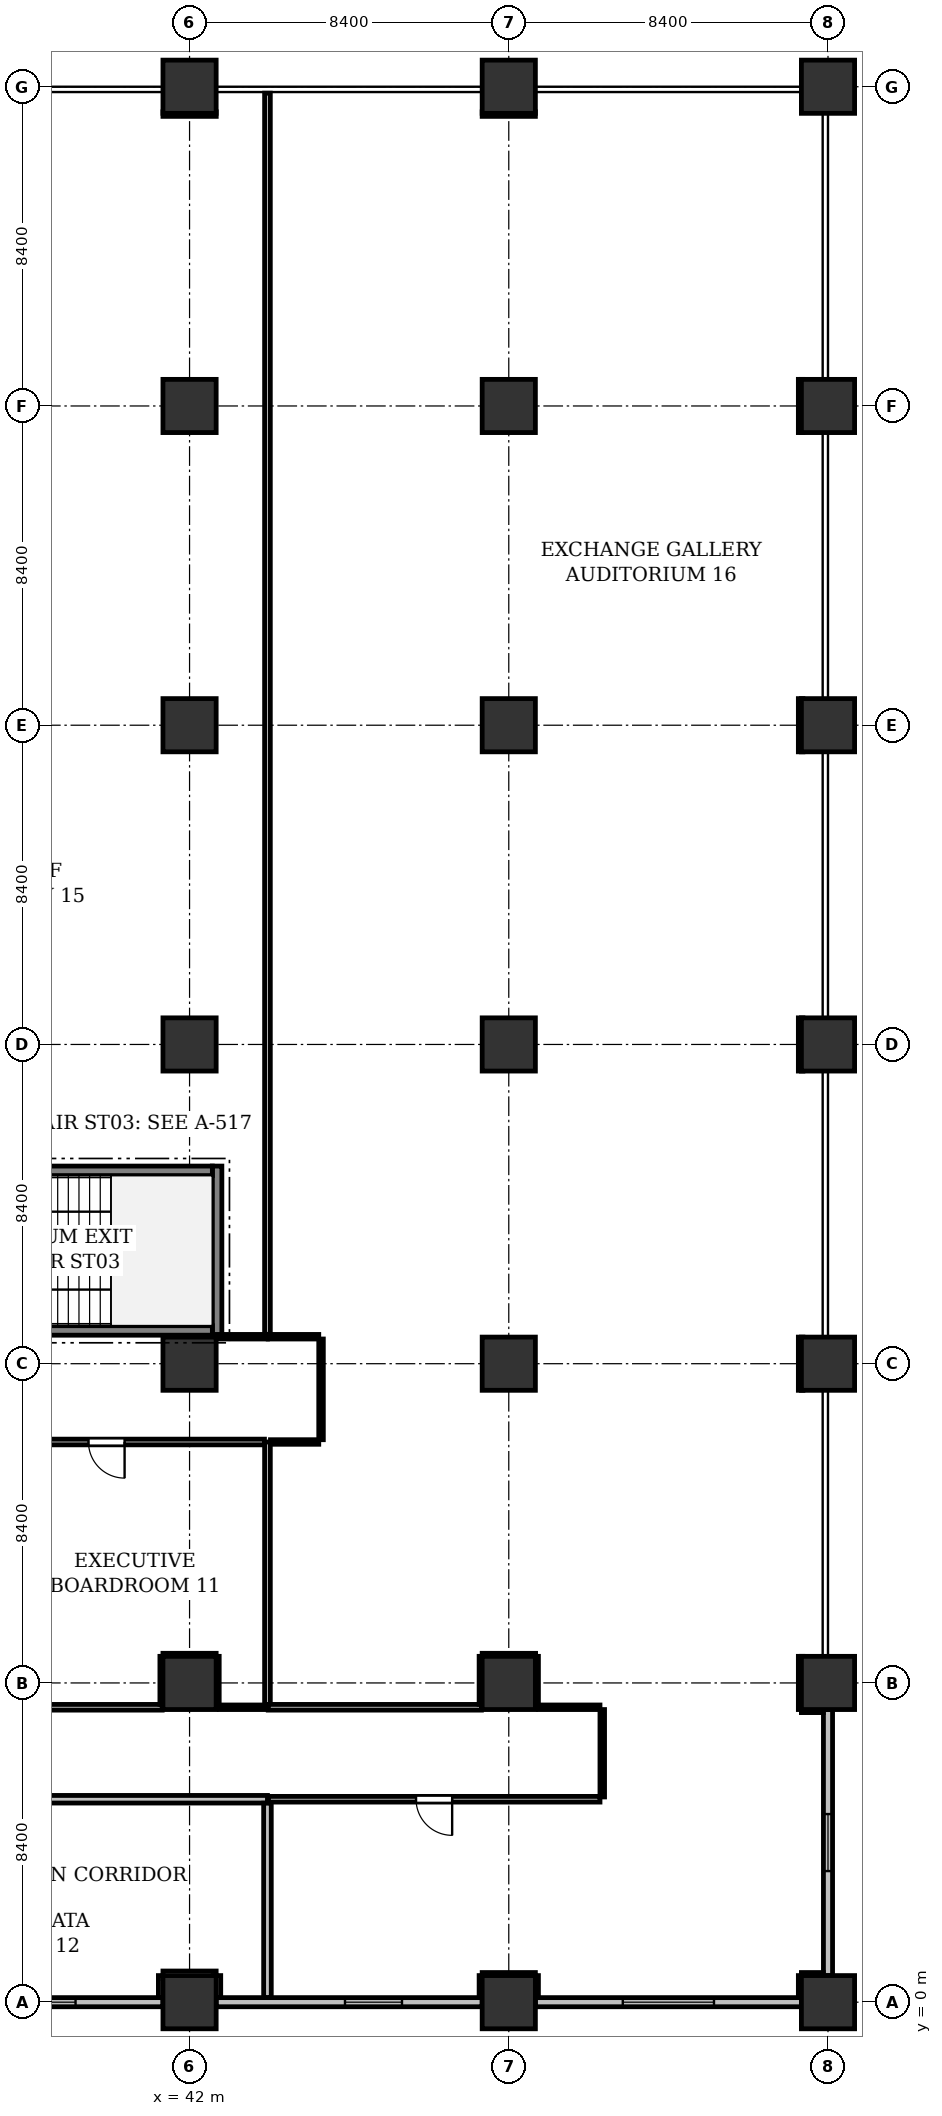
"""IFC4 building model, lengths in metres.
Left out: names, types, materials, properties, quantities, classifications, styles, units other than length and angle.
Written with IfcOpenShell. Run it as: python <this file> out.ifc"""

import sys

from ifc_helpers import new_model, si_unit, direction, frame, frame_2d, origin, origin_2d, place, context, subcontext, project, spatial, rectangle, extrude, element, fill, save


model = new_model("IFC4")
c1 = context("Model", 3, precision=1e-05, world=origin(), true_north=direction((0.0, 1.0)))
c2 = subcontext(c1, "Body", "Model", "MODEL_VIEW")
j1 = project(units=[si_unit("LENGTHUNIT", "METRE"), si_unit("PLANEANGLEUNIT", "RADIAN")], contexts=[c1])
p1 = place(None, origin())
s1 = spatial("IfcSite", under=j1, at=p1, CompositionType="ELEMENT")
p2 = place(p1, origin())
s2 = spatial("IfcBuilding", under=s1, at=p2, CompositionType="ELEMENT")
p3 = place(p2, frame((0.0, 0.0, 5.4)))
s3 = spatial("IfcBuildingStorey", under=s2, at=p3, CompositionType="ELEMENT", Elevation=5.4)
for number, where, z_axis, x_axis in (
    (1, (42.0, 0.0, 0.0), (0.0, 0.0, 1.0), (1.0, 0.0, 0.0)),
    (2, (42.0, 8.4, 0.0), (0.0, 0.0, 1.0), (1.0, 0.0, 0.0)),
    (3, (42.0, 16.8, 0.0), (0.0, 0.0, 1.0), (1.0, 0.0, 0.0)),
    (4, (42.0, 25.2, 0.0), (0.0, 0.0, 1.0), (1.0, 0.0, 0.0)),
    (5, (42.0, 33.6, 0.0), (0.0, 0.0, 1.0), (1.0, 0.0, 0.0)),
    (6, (42.0, 42.0, 0.0), (0.0, 0.0, 1.0), (1.0, 0.0, 0.0)),
    (7, (42.0, 50.4, 0.0), (0.0, 0.0, 1.0), (1.0, 0.0, 0.0)),
    (8, (50.4, 0.0, 0.0), (0.0, 0.0, 1.0), (1.0, 0.0, 0.0)),
    (9, (50.4, 8.4, 0.0), (0.0, 0.0, 1.0), (1.0, 0.0, 0.0)),
    (10, (50.4, 16.8, 0.0), (0.0, 0.0, 1.0), (1.0, 0.0, 0.0)),
    (11, (50.4, 25.2, 0.0), (0.0, 0.0, 1.0), (1.0, 0.0, 0.0)),
    (12, (50.4, 33.6, 0.0), (0.0, 0.0, 1.0), (1.0, 0.0, 0.0)),
    (13, (50.4, 42.0, 0.0), (0.0, 0.0, 1.0), (1.0, 0.0, 0.0)),
    (14, (50.4, 50.4, 0.0), (0.0, 0.0, 1.0), (1.0, 0.0, 0.0)),
    (15, (58.8, 0.0, 0.0), (0.0, 0.0, 1.0), (1.0, 0.0, 0.0)),
    (16, (58.8, 8.4, 0.0), (0.0, 0.0, 1.0), (1.0, 0.0, 0.0)),
    (17, (58.8, 16.8, 0.0), (0.0, 0.0, 1.0), (1.0, 0.0, 0.0)),
    (18, (58.8, 25.2, 0.0), (0.0, 0.0, 1.0), (1.0, 0.0, 0.0)),
    (19, (58.8, 33.6, 0.0), (0.0, 0.0, 1.0), (1.0, 0.0, 0.0)),
    (20, (58.8, 42.0, 0.0), (0.0, 0.0, 1.0), (1.0, 0.0, 0.0)),
    (21, (58.8, 50.4, 0.0), (0.0, 0.0, 1.0), (1.0, 0.0, 0.0)),
):
    element("IfcColumn", number, at=place(p3, frame(where, z_axis=z_axis, x_axis=x_axis)), inside=s3, PredefinedType="COLUMN", context=c2, shape_type="SweptSolid", body=[
        extrude(rectangle(XDim=1.4, YDim=1.4, at=origin_2d()), origin(), (0.0, 0.0, 1.0), 4.8),
    ])
p4 = place(p3, frame((58.8, 7.7, 0.0), z_axis=(0.0, 0.0, 1.0), x_axis=(0.0, -1.0, 0.0)))
e22 = element("IfcWall", 22, at=p4, inside=s3, PredefinedType="STANDARD", context=c2, shape_type="SweptSolid", body=[
    extrude(rectangle(XDim=7.0, YDim=0.24, at=frame_2d((3.5, 0.0))), origin(), (0.0, 0.0, 1.0), 3.913),
])
p5 = place(p4, frame((2.75, 0.0, 0.9)))
e23 = element("IfcOpeningElement", 23, at=p5, cuts=e22, PredefinedType="OPENING", context=c2, shape_type="SweptSolid", body=[
    extrude(rectangle(XDim=1.5, YDim=1.6, at=frame_2d((0.75, 0.8))), frame((0.0, 0.13, 0.0), z_axis=(0.0, -1.0, 0.0), x_axis=(1.0, 0.0, 0.0)), (0.0, 0.0, 1.0), 0.26),
])
p6 = place(p3, frame((58.1, 0.0, 0.0), z_axis=(0.0, 0.0, 1.0), x_axis=(-1.0, 0.0, 0.0)))
e24 = element("IfcWall", 24, at=p6, inside=s3, PredefinedType="STANDARD", context=c2, shape_type="SweptSolid", body=[
    extrude(rectangle(XDim=7.0, YDim=0.24, at=frame_2d((3.5, 0.0))), origin(), (0.0, 0.0, 1.0), 3.725),
])
p7 = place(p6, frame((2.3, 0.0, 0.9)))
e25 = element("IfcOpeningElement", 25, at=p7, cuts=e24, PredefinedType="OPENING", context=c2, shape_type="SweptSolid", body=[
    extrude(rectangle(XDim=2.4, YDim=1.8, at=frame_2d((1.2, 0.9))), frame((0.0, 0.13, 0.0), z_axis=(0.0, -1.0, 0.0), x_axis=(1.0, 0.0, 0.0)), (0.0, 0.0, 1.0), 0.26),
])
p8 = place(p3, frame((49.7, 0.0, 0.0), z_axis=(0.0, 0.0, 1.0), x_axis=(-1.0, 0.0, 0.0)))
e26 = element("IfcWall", 26, at=p8, inside=s3, PredefinedType="STANDARD", context=c2, shape_type="SweptSolid", body=[
    extrude(rectangle(XDim=7.0, YDim=0.24, at=frame_2d((3.5, 0.0))), origin(), (0.0, 0.0, 1.0), 3.725),
])
p9 = place(p8, frame((2.75, 0.0, 0.9)))
e27 = element("IfcOpeningElement", 27, at=p9, cuts=e26, PredefinedType="OPENING", context=c2, shape_type="SweptSolid", body=[
    extrude(rectangle(XDim=1.5, YDim=1.6, at=frame_2d((0.75, 0.8))), frame((0.0, 0.13, 0.0), z_axis=(0.0, -1.0, 0.0), x_axis=(1.0, 0.0, 0.0)), (0.0, 0.0, 1.0), 0.26),
])
p10 = place(p3, frame((41.3, 0.0, 0.0), z_axis=(0.0, 0.0, 1.0), x_axis=(-1.0, 0.0, 0.0)))
e28 = element("IfcWall", 28, at=p10, inside=s3, PredefinedType="STANDARD", context=c2, shape_type="SweptSolid", body=[
    extrude(rectangle(XDim=7.0, YDim=0.24, at=frame_2d((3.5, 0.0))), origin(), (0.0, 0.0, 1.0), 3.725),
])
p11 = place(p10, frame((3.224, 0.0, 0.9)))
e29 = element("IfcOpeningElement", 29, at=p11, cuts=e28, PredefinedType="OPENING", context=c2, shape_type="SweptSolid", body=[
    extrude(rectangle(XDim=2.4, YDim=1.8, at=frame_2d((1.2, 0.9))), frame((0.0, 0.13, 0.0), z_axis=(0.0, -1.0, 0.0), x_axis=(1.0, 0.0, 0.0)), (0.0, 0.0, 1.0), 0.26),
])
p12 = place(p3, frame((42.725, 17.55, 0.0), z_axis=(0.0, 0.0, 1.0), x_axis=(0.0, 1.0, 0.0)))
e30 = element("IfcWall", 30, at=p12, inside=s3, PredefinedType="SHEAR", context=c2, shape_type="SweptSolid", body=[
    extrude(rectangle(XDim=4.45, YDim=0.25, at=frame_2d((2.225, 0.0))), origin(), (0.0, 0.0, 1.0), 4.525),
])
for number, where, z_axis, x_axis in (
    (31, (34.65, 17.675, 0.0), (0.0, 0.0, 1.0), (1.0, 0.0, 0.0)),
    (32, (34.65, 21.875, 0.0), (0.0, 0.0, 1.0), (1.0, 0.0, 0.0)),
):
    element("IfcWall", number, at=place(p3, frame(where, z_axis=z_axis, x_axis=x_axis)), inside=s3, PredefinedType="SHEAR", context=c2, shape_type="SweptSolid", body=[
        extrude(rectangle(XDim=7.95, YDim=0.25, at=frame_2d((3.975, 0.0))), origin(), (0.0, 0.0, 1.0), 4.525),
    ])
p13 = place(p3, frame((39.362, 0.124, 0.0), z_axis=(0.0, 0.0, 1.0), x_axis=(0.0, 1.0, 0.0)))
e33 = element("IfcWall", 33, at=p13, inside=s3, PredefinedType="PARTITIONING", context=c2, shape_type="SweptSolid", body=[
    extrude(rectangle(XDim=14.616, YDim=0.15, at=frame_2d((7.308, 0.0))), origin(), (0.0, 0.0, 1.0), 3.725),
])
p14 = place(p3, frame((39.283, 14.74, 0.0), z_axis=(0.0, 0.0, 1.0), x_axis=(-1.0, 0.0, 0.0)))
e34 = element("IfcWall", 34, at=p14, inside=s3, PredefinedType="PARTITIONING", context=c2, shape_type="SweptSolid", body=[
    extrude(rectangle(XDim=3.623, YDim=0.135, at=frame_2d((1.812, 0.0))), origin(), (0.0, 0.0, 1.0), 4.122),
])
p15 = place(p14, frame((1.336, 0.0, 0.0)))
e35 = element("IfcOpeningElement", 35, at=p15, cuts=e34, PredefinedType="OPENING", context=c2, shape_type="SweptSolid", body=[
    extrude(rectangle(XDim=0.95, YDim=2.15, at=frame_2d((0.475, 1.075))), frame((0.0, 0.077, 0.0), z_axis=(0.0, -1.0, 0.0), x_axis=(1.0, 0.0, 0.0)), (0.0, 0.0, 1.0), 0.155),
])
p16 = place(p3, frame((39.362, 22.004, 0.0), z_axis=(0.0, 0.0, 1.0), x_axis=(0.0, 1.0, 0.0)))
e36 = element("IfcWall", 36, at=p16, inside=s3, PredefinedType="PARTITIONING", context=c2, shape_type="SweptSolid", body=[
    extrude(rectangle(XDim=28.227, YDim=0.15, at=frame_2d((14.114, 0.0))), origin(), (0.0, 0.0, 1.0), 3.725),
])
p17 = place(p3, frame((45.4, 14.74, 0.0), z_axis=(0.0, 0.0, 1.0), x_axis=(-1.0, 0.0, 0.0)))
e37 = element("IfcWall", 37, at=p17, inside=s3, PredefinedType="PARTITIONING", context=c2, shape_type="SweptSolid", body=[
    extrude(rectangle(XDim=5.959, YDim=0.15, at=frame_2d((2.979, 0.0))), origin(), (0.0, 0.0, 1.0), 3.913),
])
p18 = place(p3, frame((41.28, 0.124, 0.0), z_axis=(0.0, 0.0, 1.0), x_axis=(0.0, 1.0, 0.0)))
e38 = element("IfcWall", 38, at=p18, inside=s3, PredefinedType="PARTITIONING", context=c2, shape_type="SweptSolid", body=[
    extrude(rectangle(XDim=0.576, YDim=0.12, at=frame_2d((0.288, 0.0))), origin(), (0.0, 0.0, 1.0), 4.525),
])
p19 = place(p3, frame((41.3, 0.72, 0.0), z_axis=(0.0, 0.0, 1.0), x_axis=(1.0, 0.0, 0.0)))
e39 = element("IfcWall", 39, at=p19, inside=s3, PredefinedType="PARTITIONING", context=c2, shape_type="SweptSolid", body=[
    extrude(rectangle(XDim=1.4, YDim=0.12, at=frame_2d((0.7, 0.0))), origin(), (0.0, 0.0, 1.0), 3.913),
])
for number, where, z_axis, x_axis in (
    (40, (42.72, 0.7, 0.0), (0.0, 0.0, 1.0), (0.0, -1.0, 0.0)),
    (41, (49.68, 0.124, 0.0), (0.0, 0.0, 1.0), (0.0, 1.0, 0.0)),
):
    element("IfcWall", number, at=place(p3, frame(where, z_axis=z_axis, x_axis=x_axis)), inside=s3, PredefinedType="PARTITIONING", context=c2, shape_type="SweptSolid", body=[
        extrude(rectangle(XDim=0.576, YDim=0.12, at=frame_2d((0.288, 0.0))), origin(), (0.0, 0.0, 1.0), 4.525),
    ])
p20 = place(p3, frame((49.7, 0.72, 0.0), z_axis=(0.0, 0.0, 1.0), x_axis=(1.0, 0.0, 0.0)))
e42 = element("IfcWall", 42, at=p20, inside=s3, PredefinedType="PARTITIONING", context=c2, shape_type="SweptSolid", body=[
    extrude(rectangle(XDim=1.4, YDim=0.12, at=frame_2d((0.7, 0.0))), origin(), (0.0, 0.0, 1.0), 3.913),
])
for number, where, z_axis, x_axis in (
    (43, (51.12, 0.7, 0.0), (0.0, 0.0, 1.0), (0.0, -1.0, 0.0)),
    (44, (58.08, 0.124, 0.0), (0.0, 0.0, 1.0), (0.0, 1.0, 0.0)),
    (45, (58.1, 0.72, 0.0), (0.0, 0.0, 1.0), (1.0, 0.0, 0.0)),
    (46, (58.676, 7.68, 0.0), (0.0, 0.0, 1.0), (-1.0, 0.0, 0.0)),
):
    element("IfcWall", number, at=place(p3, frame(where, z_axis=z_axis, x_axis=x_axis)), inside=s3, PredefinedType="PARTITIONING", context=c2, shape_type="SweptSolid", body=[
        extrude(rectangle(XDim=0.576, YDim=0.12, at=frame_2d((0.288, 0.0))), origin(), (0.0, 0.0, 1.0), 4.525),
    ])
p21 = place(p3, frame((58.08, 7.7, 0.0), z_axis=(0.0, 0.0, 1.0), x_axis=(0.0, 1.0, 0.0)))
e47 = element("IfcWall", 47, at=p21, inside=s3, PredefinedType="PARTITIONING", context=c2, shape_type="SweptSolid", body=[
    extrude(rectangle(XDim=1.4, YDim=0.12, at=frame_2d((0.7, 0.0))), origin(), (0.0, 0.0, 1.0), 3.725),
])
for number, where, z_axis, x_axis in (
    (48, (58.08, 16.1, 0.0), (0.0, 0.0, 1.0), (0.0, 1.0, 0.0)),
    (49, (58.08, 24.5, 0.0), (0.0, 0.0, 1.0), (0.0, 1.0, 0.0)),
):
    element("IfcWall", number, at=place(p3, frame(where, z_axis=z_axis, x_axis=x_axis)), inside=s3, PredefinedType="PARTITIONING", context=c2, shape_type="SweptSolid", body=[
        extrude(rectangle(XDim=1.4, YDim=0.12, at=frame_2d((0.7, 0.0))), origin(), (0.0, 0.0, 1.0), 3.725),
    ])
p22 = place(p3, frame((58.08, 32.9, 0.0), z_axis=(0.0, 0.0, 1.0), x_axis=(0.0, 1.0, 0.0)))
e50 = element("IfcWall", 50, at=p22, inside=s3, PredefinedType="PARTITIONING", context=c2, shape_type="SweptSolid", body=[
    extrude(rectangle(XDim=1.4, YDim=0.12, at=frame_2d((0.7, 0.0))), origin(), (0.0, 0.0, 1.0), 3.725),
])
p23 = place(p3, frame((58.08, 41.3, 0.0), z_axis=(0.0, 0.0, 1.0), x_axis=(0.0, 1.0, 0.0)))
e51 = element("IfcWall", 51, at=p23, inside=s3, PredefinedType="PARTITIONING", context=c2, shape_type="SweptSolid", body=[
    extrude(rectangle(XDim=1.4, YDim=0.12, at=frame_2d((0.7, 0.0))), origin(), (0.0, 0.0, 1.0), 3.725),
])
p24 = place(p3, frame((51.1, 49.68, 0.0), z_axis=(0.0, 0.0, 1.0), x_axis=(-1.0, 0.0, 0.0)))
e52 = element("IfcWall", 52, at=p24, inside=s3, PredefinedType="PARTITIONING", context=c2, shape_type="SweptSolid", body=[
    extrude(rectangle(XDim=1.4, YDim=0.12, at=frame_2d((0.7, 0.0))), origin(), (0.0, 0.0, 1.0), 3.913),
])
p25 = place(p3, frame((42.7, 49.68, 0.0), z_axis=(0.0, 0.0, 1.0), x_axis=(-1.0, 0.0, 0.0)))
e53 = element("IfcWall", 53, at=p25, inside=s3, PredefinedType="PARTITIONING", context=c2, shape_type="SweptSolid", body=[
    extrude(rectangle(XDim=1.4, YDim=0.12, at=frame_2d((0.7, 0.0))), origin(), (0.0, 0.0, 1.0), 3.913),
])
p26 = place(p3, frame((42.854, 20.16, 0.0), z_axis=(0.0, 0.0, 1.0), x_axis=(1.0, 0.0, 0.0)))
e54 = element("IfcWall", 54, at=p26, inside=s3, PredefinedType="PARTITIONING", context=c2, shape_type="SweptSolid", body=[
    extrude(rectangle(XDim=10.146, YDim=0.15, at=frame_2d((5.073, 0.0))), origin(), (0.0, 0.0, 1.0), 3.913),
])
p27 = place(p26, frame((4.598, 0.0, 0.0)))
e55 = element("IfcOpeningElement", 55, at=p27, cuts=e54, PredefinedType="OPENING", context=c2, shape_type="SweptSolid", body=[
    extrude(rectangle(XDim=0.95, YDim=2.15, at=frame_2d((0.475, 1.075))), frame((0.0, 0.085, 0.0), z_axis=(0.0, -1.0, 0.0), x_axis=(1.0, 0.0, 0.0)), (0.0, 0.0, 1.0), 0.17),
])
p28 = place(p3, frame((53.06, 20.1, 0.0), z_axis=(0.0, 0.0, 1.0), x_axis=(0.0, -1.0, 0.0)))
e56 = element("IfcWall", 56, at=p28, inside=s3, PredefinedType="PARTITIONING", context=c2, shape_type="SweptSolid", body=[
    extrude(rectangle(XDim=2.5, YDim=0.12, at=frame_2d((1.25, 0.0))), origin(), (0.0, 0.0, 1.0), 4.525),
])
p29 = place(p3, frame((53.0, 17.54, 0.0), z_axis=(0.0, 0.0, 1.0), x_axis=(-1.0, 0.0, 0.0)))
e57 = element("IfcWall", 57, at=p29, inside=s3, PredefinedType="PARTITIONING", context=c2, shape_type="SweptSolid", body=[
    extrude(rectangle(XDim=7.54, YDim=0.15, at=frame_2d((3.77, 0.0))), origin(), (0.0, 0.0, 1.0), 3.913),
])
p30 = place(p3, frame((45.46, 17.461, 0.0), z_axis=(0.0, 0.0, 1.0), x_axis=(0.0, -1.0, 0.0)))
e58 = element("IfcWall", 58, at=p30, inside=s3, PredefinedType="PARTITIONING", context=c2, shape_type="SweptSolid", body=[
    extrude(rectangle(XDim=2.661, YDim=0.12, at=frame_2d((1.331, 0.0))), origin(), (0.0, 0.0, 1.0), 3.725),
])
p31 = place(p5, origin())
e59 = element("IfcWindow", 59, at=p31, inside=s3, PartitioningType="SINGLE_PANEL", PredefinedType="WINDOW", context=c2, shape_type="SweptSolid", body=[
    extrude(rectangle(XDim=1.5, YDim=1.6, at=frame_2d((0.75, 0.8))), frame((0.0, 0.03, 0.0), z_axis=(0.0, -1.0, 0.0), x_axis=(1.0, 0.0, 0.0)), (0.0, 0.0, 1.0), 0.06),
])
fill(e23, e59)
p32 = place(p7, origin())
e60 = element("IfcWindow", 60, at=p32, inside=s3, PartitioningType="SINGLE_PANEL", PredefinedType="WINDOW", context=c2, shape_type="SweptSolid", body=[
    extrude(rectangle(XDim=2.4, YDim=1.8, at=frame_2d((1.2, 0.9))), frame((0.0, 0.03, 0.0), z_axis=(0.0, -1.0, 0.0), x_axis=(1.0, 0.0, 0.0)), (0.0, 0.0, 1.0), 0.06),
])
fill(e25, e60)
p33 = place(p9, origin())
e61 = element("IfcWindow", 61, at=p33, inside=s3, PartitioningType="SINGLE_PANEL", PredefinedType="WINDOW", context=c2, shape_type="SweptSolid", body=[
    extrude(rectangle(XDim=1.5, YDim=1.6, at=frame_2d((0.75, 0.8))), frame((0.0, 0.03, 0.0), z_axis=(0.0, -1.0, 0.0), x_axis=(1.0, 0.0, 0.0)), (0.0, 0.0, 1.0), 0.06),
])
fill(e27, e61)
p34 = place(p27, origin())
e62 = element("IfcDoor", 62, at=p34, inside=s3, OperationType="SINGLE_SWING_LEFT", PredefinedType="DOOR", context=c2, shape_type="SweptSolid", body=[
    extrude(rectangle(XDim=0.95, YDim=2.15, at=frame_2d((0.475, 1.075))), frame((0.0, 0.025, 0.0), z_axis=(0.0, -1.0, 0.0), x_axis=(1.0, 0.0, 0.0)), (0.0, 0.0, 1.0), 0.05),
])
fill(e55, e62)
save(model, sys.argv[1])
